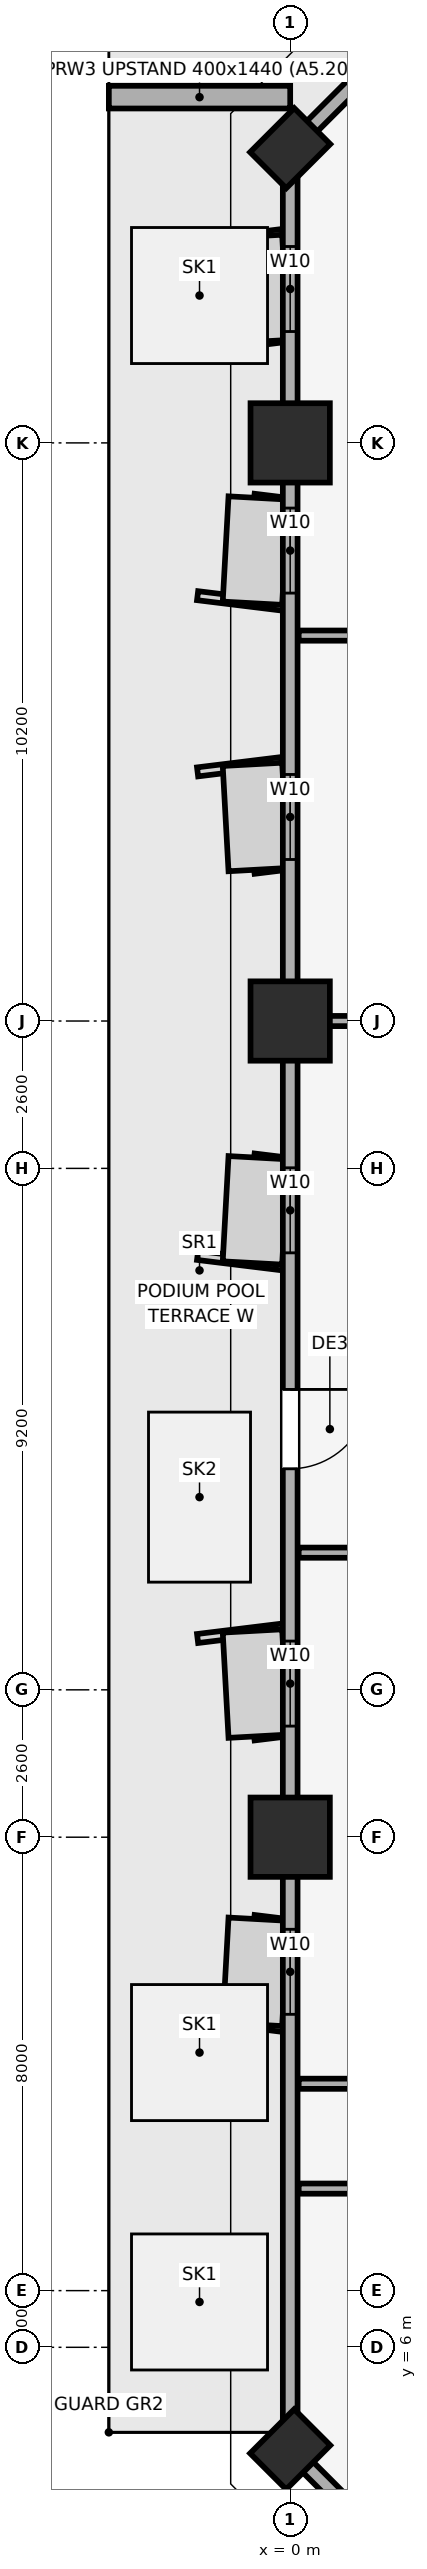
"""IFC4 building model, lengths in metres.
Left out: names, types, materials, properties, quantities, classifications, styles, units other than length and angle.
Written with IfcOpenShell. Run it as: python <this file> out.ifc"""

import sys

from ifc_helpers import new_model, si_unit, direction, frame, frame_2d, origin, origin_2d, place, context, subcontext, project, spatial, rectangle, extrude, element, fill, save


model = new_model("IFC4")
c1 = context("Model", 3, precision=1e-05, world=origin(), true_north=direction((0.0, 1.0)))
c2 = subcontext(c1, "Body", "Model", "MODEL_VIEW")
j1 = project(units=[si_unit("LENGTHUNIT", "METRE"), si_unit("PLANEANGLEUNIT", "RADIAN")], contexts=[c1])
p1 = place(None, origin())
s1 = spatial("IfcSite", under=j1, at=p1, CompositionType="ELEMENT")
p2 = place(p1, origin())
s2 = spatial("IfcBuilding", under=s1, at=p2, CompositionType="ELEMENT")
p3 = place(p2, frame((0.0, 0.0, 31.4)))
s3 = spatial("IfcBuildingStorey", under=s2, at=p3, CompositionType="ELEMENT", Elevation=31.4)
for number, where, z_axis, x_axis in (
    (1, (0.0, 15.0, 0.0), (0.0, 0.0, 1.0), (1.0, 0.0, 0.0)),
    (2, (0.0, 29.4, 0.0), (0.0, 0.0, 1.0), (1.0, 0.0, 0.0)),
    (3, (0.0, 39.6, 0.0), (0.0, 0.0, 1.0), (1.0, 0.0, 0.0)),
):
    element("IfcColumn", number, at=place(p3, frame(where, z_axis=z_axis, x_axis=x_axis)), inside=s3, PredefinedType="COLUMN", context=c2, shape_type="SweptSolid", body=[
        extrude(rectangle(XDim=1.4, YDim=1.4, at=origin_2d()), origin(), (0.0, 0.0, 1.0), 3.51),
    ])
for number, where, z_axis, x_axis in (
    (4, (0.0, 44.8, 0.0), (0.0, 0.0, 1.0), (0.707, 0.707, 0.0)),
    (5, (0.0, 4.2, 0.0), (0.0, 0.0, 1.0), (0.707, 0.707, 0.0)),
):
    element("IfcColumn", number, at=place(p3, frame(where, z_axis=z_axis, x_axis=x_axis)), inside=s3, PredefinedType="PILASTER", context=c2, shape_type="SweptSolid", body=[
        extrude(rectangle(XDim=1.1, YDim=0.9, at=origin_2d()), origin(), (0.0, 0.0, 1.0), 3.51),
    ])
p4 = place(p3, frame((4.2, 49.0, 0.0), z_axis=(0.0, 0.0, 1.0), x_axis=(-0.707106781187, -0.707106781187, 0.0)))
e6 = element("IfcWall", 6, at=p4, inside=s3, PredefinedType="SOLIDWALL", context=c2, shape_type="SweptSolid", body=[
    extrude(rectangle(XDim=5.94, YDim=0.26, at=frame_2d((2.97, 0.0))), origin(), (0.0, 0.0, 1.0), 2.56),
])
p5 = place(p3, frame((0.0, 44.8, 0.0), z_axis=(0.0, 0.0, 1.0), x_axis=(0.0, -1.0, 0.0)))
e7 = element("IfcWall", 7, at=p5, inside=s3, PredefinedType="SOLIDWALL", context=c2, shape_type="SweptSolid", body=[
    extrude(rectangle(XDim=40.6, YDim=0.26, at=frame_2d((20.3, 0.0))), origin(), (0.0, 0.0, 1.0), 2.56),
])
p6 = place(p5, frame((21.9, 0.0, 0.0)))
e8 = element("IfcOpeningElement", 8, at=p6, cuts=e7, PredefinedType="OPENING", context=c2, shape_type="SweptSolid", body=[
    extrude(rectangle(XDim=1.4, YDim=2.2, at=frame_2d((0.7, 1.1))), frame((0.0, 0.14, 0.0), z_axis=(0.0, -1.0, 0.0), x_axis=(1.0, 0.0, 0.0)), (0.0, 0.0, 1.0), 0.28),
])
p7 = place(p5, frame((31.425, 0.0, 0.85)))
e9 = element("IfcOpeningElement", 9, at=p7, cuts=e7, PredefinedType="OPENING", context=c2, shape_type="SweptSolid", body=[
    extrude(rectangle(XDim=1.5, YDim=1.4, at=frame_2d((0.75, 0.7))), frame((0.0, 0.14, 0.0), z_axis=(0.0, -1.0, 0.0), x_axis=(1.0, 0.0, 0.0)), (0.0, 0.0, 1.0), 0.28),
])
p8 = place(p5, frame((26.34, 0.0, 0.85)))
e10 = element("IfcOpeningElement", 10, at=p8, cuts=e7, PredefinedType="OPENING", context=c2, shape_type="SweptSolid", body=[
    extrude(rectangle(XDim=1.5, YDim=1.4, at=frame_2d((0.75, 0.7))), frame((0.0, 0.14, 0.0), z_axis=(0.0, -1.0, 0.0), x_axis=(1.0, 0.0, 0.0)), (0.0, 0.0, 1.0), 0.28),
])
p9 = place(p5, frame((17.99, 0.0, 0.85)))
e11 = element("IfcOpeningElement", 11, at=p9, cuts=e7, PredefinedType="OPENING", context=c2, shape_type="SweptSolid", body=[
    extrude(rectangle(XDim=1.5, YDim=1.4, at=frame_2d((0.75, 0.7))), frame((0.0, 0.14, 0.0), z_axis=(0.0, -1.0, 0.0), x_axis=(1.0, 0.0, 0.0)), (0.0, 0.0, 1.0), 0.28),
])
p10 = place(p5, frame((11.05, 0.0, 0.85)))
e12 = element("IfcOpeningElement", 12, at=p10, cuts=e7, PredefinedType="OPENING", context=c2, shape_type="SweptSolid", body=[
    extrude(rectangle(XDim=1.5, YDim=1.4, at=frame_2d((0.75, 0.7))), frame((0.0, 0.14, 0.0), z_axis=(0.0, -1.0, 0.0), x_axis=(1.0, 0.0, 0.0)), (0.0, 0.0, 1.0), 0.28),
])
p11 = place(p5, frame((6.35, 0.0, 0.85)))
e13 = element("IfcOpeningElement", 13, at=p11, cuts=e7, PredefinedType="OPENING", context=c2, shape_type="SweptSolid", body=[
    extrude(rectangle(XDim=1.5, YDim=1.4, at=frame_2d((0.75, 0.7))), frame((0.0, 0.14, 0.0), z_axis=(0.0, -1.0, 0.0), x_axis=(1.0, 0.0, 0.0)), (0.0, 0.0, 1.0), 0.28),
])
p12 = place(p5, frame((1.735, 0.0, 0.85)))
e14 = element("IfcOpeningElement", 14, at=p12, cuts=e7, PredefinedType="OPENING", context=c2, shape_type="SweptSolid", body=[
    extrude(rectangle(XDim=1.5, YDim=1.4, at=frame_2d((0.75, 0.7))), frame((0.0, 0.14, 0.0), z_axis=(0.0, -1.0, 0.0), x_axis=(1.0, 0.0, 0.0)), (0.0, 0.0, 1.0), 0.28),
])
p13 = place(p3, frame((0.0, 4.2, 0.0), z_axis=(0.0, 0.0, 1.0), x_axis=(0.707106781187, -0.707106781187, 0.0)))
e15 = element("IfcWall", 15, at=p13, inside=s3, PredefinedType="SOLIDWALL", context=c2, shape_type="SweptSolid", body=[
    extrude(rectangle(XDim=5.94, YDim=0.26, at=frame_2d((2.97, 0.0))), origin(), (0.0, 0.0, 1.0), 2.56),
])
p14 = place(p3, frame((-3.2, 45.7, -0.24), z_axis=(0.0, 0.0, 1.0), x_axis=(1.0, 0.0, 0.0)))
e16 = element("IfcWall", 16, at=p14, inside=s3, PredefinedType="PARAPET", context=c2, shape_type="SweptSolid", body=[
    extrude(rectangle(XDim=3.2, YDim=0.4, at=frame_2d((1.6, 0.0))), origin(), (0.0, 0.0, 1.0), 1.44),
])
p15 = place(p3, frame((0.15, 8.8, 0.0), z_axis=(0.0, 0.0, 1.0), x_axis=(1.0, 0.0, 0.0)))
e17 = element("IfcWall", 17, at=p15, inside=s3, PredefinedType="PARTITIONING", context=c2, shape_type="SweptSolid", body=[
    extrude(rectangle(XDim=9.621, YDim=0.18, at=frame_2d((4.811, 0.0))), origin(), (0.0, 0.0, 1.0), 3.51),
])
p16 = place(p15, frame((4.95, 0.0, 0.0)))
e18 = element("IfcOpeningElement", 18, at=p16, cuts=e17, PredefinedType="OPENING", context=c2, shape_type="SweptSolid", body=[
    extrude(rectangle(XDim=1.0, YDim=2.15, at=frame_2d((0.5, 1.075))), frame((0.0, 0.1, 0.0), z_axis=(0.0, -1.0, 0.0), x_axis=(1.0, 0.0, 0.0)), (0.0, 0.0, 1.0), 0.2),
])
for number, where, z_axis, x_axis in (
    (19, (0.15, 10.65, 0.0), (0.0, 0.0, 1.0), (1.0, 0.0, 0.0)),
    (20, (0.15, 20.02, 0.0), (0.0, 0.0, 1.0), (1.0, 0.0, 0.0)),
):
    element("IfcWall", number, at=place(p3, frame(where, z_axis=z_axis, x_axis=x_axis)), inside=s3, PredefinedType="PARTITIONING", context=c2, shape_type="SweptSolid", body=[
        extrude(rectangle(XDim=13.65, YDim=0.18, at=frame_2d((6.825, 0.0))), origin(), (0.0, 0.0, 1.0), 3.51),
    ])
p17 = place(p3, frame((0.15, 29.4, 0.0), z_axis=(0.0, 0.0, 1.0), x_axis=(1.0, 0.0, 0.0)))
e21 = element("IfcWall", 21, at=p17, inside=s3, PredefinedType="PARTITIONING", context=c2, shape_type="SweptSolid", body=[
    extrude(rectangle(XDim=13.65, YDim=0.18, at=frame_2d((6.825, 0.0))), origin(), (0.0, 0.0, 1.0), 2.86),
])
p18 = place(p3, frame((0.15, 36.2, 0.0), z_axis=(0.0, 0.0, 1.0), x_axis=(1.0, 0.0, 0.0)))
e22 = element("IfcWall", 22, at=p18, inside=s3, PredefinedType="PARTITIONING", context=c2, shape_type="SweptSolid", body=[
    extrude(rectangle(XDim=13.65, YDim=0.18, at=frame_2d((6.825, 0.0))), origin(), (0.0, 0.0, 1.0), 3.51),
])
p19 = place(p3, frame((0.0, 0.0, -0.28)))
p20 = place(p19, frame((-1.6, 21.0, 0.23)))
e23 = element("IfcWindow", 23, at=p20, inside=s3, PartitioningType="SINGLE_PANEL", PredefinedType="SKYLIGHT", context=c2, shape_type="SweptSolid", body=[
    extrude(rectangle(XDim=1.8, YDim=3.0, at=origin_2d()), origin(), (0.0, 0.0, 1.0), 0.05),
])
p21 = place(p19, frame((-1.6, 6.8, 0.23)))
e24 = element("IfcWindow", 24, at=p21, inside=s3, PartitioningType="SINGLE_PANEL", PredefinedType="SKYLIGHT", context=c2, shape_type="SweptSolid", body=[
    extrude(rectangle(XDim=2.4, YDim=2.4, at=origin_2d()), origin(), (0.0, 0.0, 1.0), 0.05),
])
p22 = place(p19, frame((-1.6, 11.2, 0.23)))
e25 = element("IfcWindow", 25, at=p22, inside=s3, PartitioningType="SINGLE_PANEL", PredefinedType="SKYLIGHT", context=c2, shape_type="SweptSolid", body=[
    extrude(rectangle(XDim=2.4, YDim=2.4, at=origin_2d()), origin(), (0.0, 0.0, 1.0), 0.05),
])
p23 = place(p19, frame((-1.6, 42.2, 0.23)))
e26 = element("IfcWindow", 26, at=p23, inside=s3, PartitioningType="SINGLE_PANEL", PredefinedType="SKYLIGHT", context=c2, shape_type="SweptSolid", body=[
    extrude(rectangle(XDim=2.4, YDim=2.4, at=origin_2d()), origin(), (0.0, 0.0, 1.0), 0.05),
])
p24 = place(p6, origin())
e27 = element("IfcDoor", 27, at=p24, inside=s3, OperationType="SINGLE_SWING_LEFT", PredefinedType="DOOR", context=c2, shape_type="SweptSolid", body=[
    extrude(rectangle(XDim=1.4, YDim=2.2, at=frame_2d((0.7, 1.1))), frame((0.0, 0.025, 0.0), z_axis=(0.0, -1.0, 0.0), x_axis=(1.0, 0.0, 0.0)), (0.0, 0.0, 1.0), 0.05),
])
fill(e8, e27)
p25 = place(p7, origin())
e28 = element("IfcWindow", 28, at=p25, inside=s3, PartitioningType="SINGLE_PANEL", PredefinedType="WINDOW", context=c2, shape_type="SweptSolid", body=[
    extrude(rectangle(XDim=1.5, YDim=1.4, at=frame_2d((0.75, 0.7))), frame((0.0, 0.03, 0.0), z_axis=(0.0, -1.0, 0.0), x_axis=(1.0, 0.0, 0.0)), (0.0, 0.0, 1.0), 0.06),
])
fill(e9, e28)
p26 = place(p8, origin())
e29 = element("IfcWindow", 29, at=p26, inside=s3, PartitioningType="SINGLE_PANEL", PredefinedType="WINDOW", context=c2, shape_type="SweptSolid", body=[
    extrude(rectangle(XDim=1.5, YDim=1.4, at=frame_2d((0.75, 0.7))), frame((0.0, 0.03, 0.0), z_axis=(0.0, -1.0, 0.0), x_axis=(1.0, 0.0, 0.0)), (0.0, 0.0, 1.0), 0.06),
])
fill(e10, e29)
p27 = place(p9, origin())
e30 = element("IfcWindow", 30, at=p27, inside=s3, PartitioningType="SINGLE_PANEL", PredefinedType="WINDOW", context=c2, shape_type="SweptSolid", body=[
    extrude(rectangle(XDim=1.5, YDim=1.4, at=frame_2d((0.75, 0.7))), frame((0.0, 0.03, 0.0), z_axis=(0.0, -1.0, 0.0), x_axis=(1.0, 0.0, 0.0)), (0.0, 0.0, 1.0), 0.06),
])
fill(e11, e30)
p28 = place(p10, origin())
e31 = element("IfcWindow", 31, at=p28, inside=s3, PartitioningType="SINGLE_PANEL", PredefinedType="WINDOW", context=c2, shape_type="SweptSolid", body=[
    extrude(rectangle(XDim=1.5, YDim=1.4, at=frame_2d((0.75, 0.7))), frame((0.0, 0.03, 0.0), z_axis=(0.0, -1.0, 0.0), x_axis=(1.0, 0.0, 0.0)), (0.0, 0.0, 1.0), 0.06),
])
fill(e12, e31)
p29 = place(p11, origin())
e32 = element("IfcWindow", 32, at=p29, inside=s3, PartitioningType="SINGLE_PANEL", PredefinedType="WINDOW", context=c2, shape_type="SweptSolid", body=[
    extrude(rectangle(XDim=1.5, YDim=1.4, at=frame_2d((0.75, 0.7))), frame((0.0, 0.03, 0.0), z_axis=(0.0, -1.0, 0.0), x_axis=(1.0, 0.0, 0.0)), (0.0, 0.0, 1.0), 0.06),
])
fill(e13, e32)
p30 = place(p12, origin())
e33 = element("IfcWindow", 33, at=p30, inside=s3, PartitioningType="SINGLE_PANEL", PredefinedType="WINDOW", context=c2, shape_type="SweptSolid", body=[
    extrude(rectangle(XDim=1.5, YDim=1.4, at=frame_2d((0.75, 0.7))), frame((0.0, 0.03, 0.0), z_axis=(0.0, -1.0, 0.0), x_axis=(1.0, 0.0, 0.0)), (0.0, 0.0, 1.0), 0.06),
])
fill(e14, e33)
save(model, sys.argv[1])
